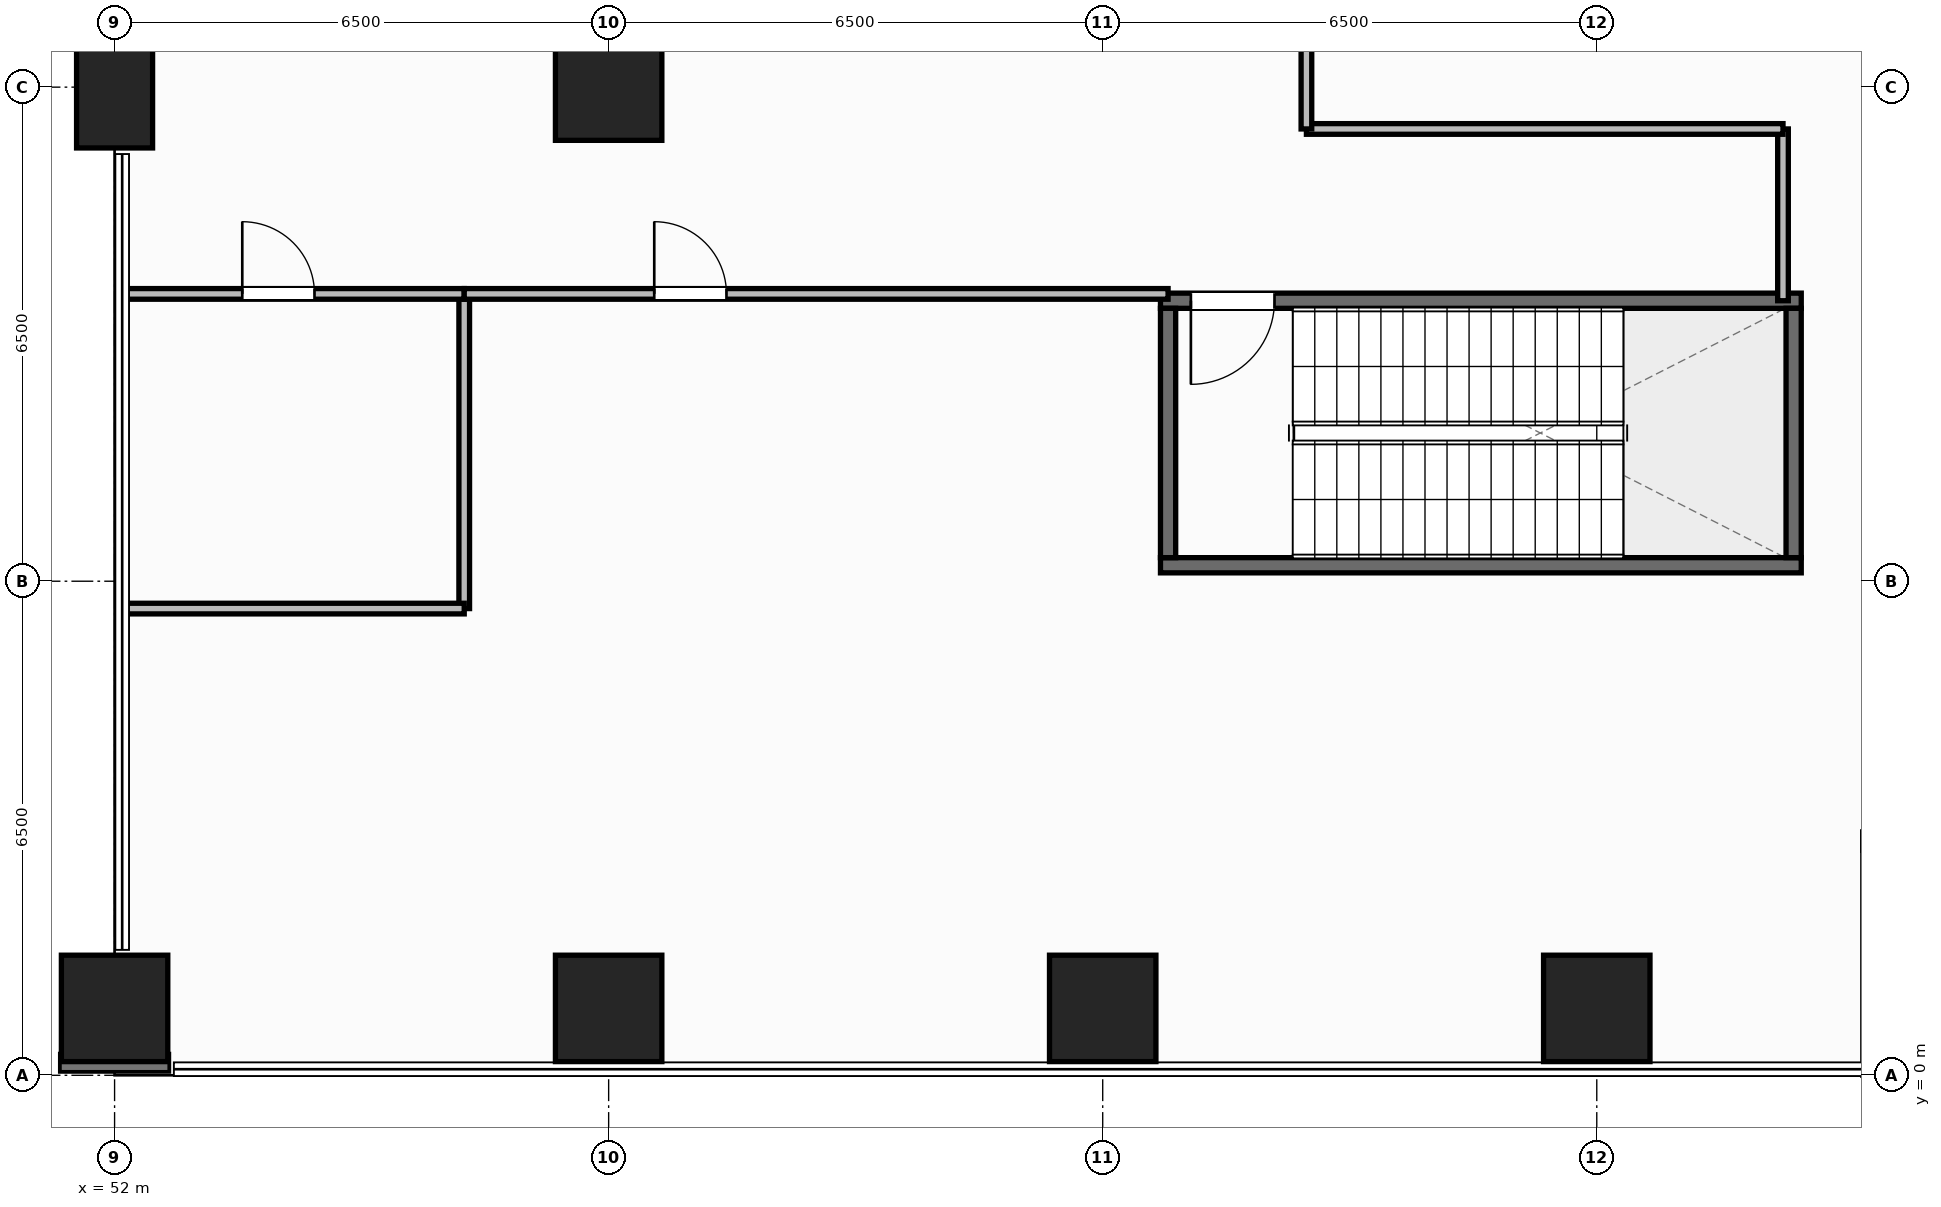
"""IFC4 building model, lengths in metres.
Left out: names, types, materials, properties, quantities, classifications, styles, units other than length and angle.
Written with IfcOpenShell. Run it as: python <this file> out.ifc"""

import sys

from ifc_helpers import new_model, si_unit, direction, frame, frame_2d, origin, origin_2d, place, context, subcontext, project, spatial, rectangle, extrude, element, fill, save


model = new_model("IFC4")
c1 = context("Model", 3, precision=1e-05, world=origin(), true_north=direction((0.0, 1.0)))
c2 = subcontext(c1, "Body", "Model", "MODEL_VIEW")
j1 = project(units=[si_unit("LENGTHUNIT", "METRE"), si_unit("PLANEANGLEUNIT", "RADIAN")], contexts=[c1])
p1 = place(None, origin())
s1 = spatial("IfcSite", under=j1, at=p1, CompositionType="ELEMENT")
p2 = place(p1, origin())
s2 = spatial("IfcBuilding", under=s1, at=p2, CompositionType="ELEMENT")
p3 = place(p2, frame((0.0, 0.0, 11.5)))
s3 = spatial("IfcBuildingStorey", under=s2, at=p3, CompositionType="ELEMENT", Elevation=11.5)
p4 = place(p3, frame((65.76, 6.71, 0.0), z_axis=(0.0, 0.0, 1.0), x_axis=(1.0, 0.0, 0.0)))
e1 = element("IfcWall", 1, at=p4, inside=s3, PredefinedType="SHEAR", context=c2, shape_type="SweptSolid", body=[
    extrude(rectangle(XDim=8.43, YDim=0.2, at=frame_2d((4.215, 0.0))), origin(), (0.0, 0.0, 1.0), 5.5),
])
p5 = place(p3, frame((65.76, 10.19, 0.0), z_axis=(0.0, 0.0, 1.0), x_axis=(1.0, 0.0, 0.0)))
e2 = element("IfcWall", 2, at=p5, inside=s3, PredefinedType="SHEAR", context=c2, shape_type="SweptSolid", body=[
    extrude(rectangle(XDim=8.43, YDim=0.2, at=frame_2d((4.215, 0.0))), origin(), (0.0, 0.0, 1.0), 5.5),
])
p6 = place(p5, frame((0.4, 0.0, 0.0)))
e3 = element("IfcOpeningElement", 3, at=p6, cuts=e2, PredefinedType="OPENING", context=c2, shape_type="SweptSolid", body=[
    extrude(rectangle(XDim=1.1, YDim=2.15, at=frame_2d((0.55, 1.075))), frame((0.0, 0.11, 0.0), z_axis=(0.0, -1.0, 0.0), x_axis=(1.0, 0.0, 0.0)), (0.0, 0.0, 1.0), 0.22),
])
for number, where, z_axis, x_axis in (
    (4, (65.86, 6.81, 0.0), (0.0, 0.0, 1.0), (0.0, 1.0, 0.0)),
    (5, (74.09, 6.81, 0.0), (0.0, 0.0, 1.0), (0.0, 1.0, 0.0)),
):
    element("IfcWall", number, at=place(p3, frame(where, z_axis=z_axis, x_axis=x_axis)), inside=s3, PredefinedType="SHEAR", context=c2, shape_type="SweptSolid", body=[
        extrude(rectangle(XDim=3.28, YDim=0.2, at=frame_2d((1.64, 0.0))), origin(), (0.0, 0.0, 1.0), 5.5),
    ])
p7 = place(p3, frame((58.5, 13.0, 0.0), z_axis=(0.0, 0.0, 1.0), x_axis=(1.0, 0.0, 0.0)))
e6 = element("IfcColumn", 6, at=p7, inside=s3, PredefinedType="COLUMN", context=c2, shape_type="SweptSolid", body=[
    extrude(rectangle(XDim=1.4, YDim=1.4, at=origin_2d()), origin(), (0.0, 0.0, 1.0), 5.5),
])
p8 = place(p3, frame((52.0, 13.0, 0.0), z_axis=(0.0, 0.0, 1.0), x_axis=(1.0, 0.0, 0.0)))
e7 = element("IfcColumn", 7, at=p8, inside=s3, PredefinedType="PILASTER", context=c2, shape_type="SweptSolid", body=[
    extrude(rectangle(XDim=1.0, YDim=1.6, at=origin_2d()), origin(), (0.0, 0.0, 1.0), 5.5),
])
for number, where, z_axis, x_axis in (
    (8, (52.0, 0.88, 0.0), (0.0, 0.0, 1.0), (1.0, 0.0, 0.0)),
    (9, (58.5, 0.88, 0.0), (0.0, 0.0, 1.0), (1.0, 0.0, 0.0)),
    (10, (65.0, 0.88, 0.0), (0.0, 0.0, 1.0), (1.0, 0.0, 0.0)),
    (11, (71.5, 0.88, 0.0), (0.0, 0.0, 1.0), (1.0, 0.0, 0.0)),
):
    element("IfcColumn", number, at=place(p3, frame(where, z_axis=z_axis, x_axis=x_axis)), inside=s3, PredefinedType="COLUMN", context=c2, shape_type="SweptSolid", body=[
        extrude(rectangle(XDim=1.4, YDim=1.4, at=origin_2d()), origin(), (0.0, 0.0, 1.0), 5.5),
    ])
p9 = place(p3, frame((56.6, 6.14, 0.0), z_axis=(0.0, 0.0, 1.0), x_axis=(0.0, 1.0, 0.0)))
e12 = element("IfcWall", 12, at=p9, inside=s3, PredefinedType="PARTITIONING", context=c2, shape_type="SweptSolid", body=[
    extrude(rectangle(XDim=4.14, YDim=0.14, at=frame_2d((2.07, 0.0))), origin(), (0.0, 0.0, 1.0), 5.22),
])
p10 = place(p3, frame((52.08, 6.14, 0.0), z_axis=(0.0, 0.0, 1.0), x_axis=(1.0, 0.0, 0.0)))
e13 = element("IfcWall", 13, at=p10, inside=s3, PredefinedType="PARTITIONING", context=c2, shape_type="SweptSolid", body=[
    extrude(rectangle(XDim=4.52, YDim=0.14, at=frame_2d((2.26, 0.0))), origin(), (0.0, 0.0, 1.0), 5.22),
])
p11 = place(p3, frame((73.95, 10.19, 0.0), z_axis=(0.0, 0.0, 1.0), x_axis=(0.0, 1.0, 0.0)))
e14 = element("IfcWall", 14, at=p11, inside=s3, PredefinedType="PARTITIONING", context=c2, shape_type="SweptSolid", body=[
    extrude(rectangle(XDim=2.26, YDim=0.14, at=frame_2d((1.13, 0.0))), origin(), (0.0, 0.0, 1.0), 5.22),
])
p12 = place(p3, frame((67.68, 12.45, 0.0), z_axis=(0.0, 0.0, 1.0), x_axis=(1.0, 0.0, 0.0)))
e15 = element("IfcWall", 15, at=p12, inside=s3, PredefinedType="PARTITIONING", context=c2, shape_type="SweptSolid", body=[
    extrude(rectangle(XDim=6.27, YDim=0.14, at=frame_2d((3.135, 0.0))), origin(), (0.0, 0.0, 1.0), 5.22),
])
p13 = place(p3, frame((67.68, 12.45, 0.0), z_axis=(0.0, 0.0, 1.0), x_axis=(0.0, 1.0, 0.0)))
e16 = element("IfcWall", 16, at=p13, inside=s3, PredefinedType="PARTITIONING", context=c2, shape_type="SweptSolid", body=[
    extrude(rectangle(XDim=23.13, YDim=0.14, at=frame_2d((11.565, 0.0))), origin(), (0.0, 0.0, 1.0), 5.22),
])
p14 = place(p13, frame((5.0, 0.0, 0.0)))
e17 = element("IfcOpeningElement", 17, at=p14, cuts=e16, PredefinedType="OPENING", context=c2, shape_type="SweptSolid", body=[
    extrude(rectangle(XDim=1.1, YDim=2.15, at=frame_2d((0.55, 1.075))), frame((0.0, 0.08, 0.0), z_axis=(0.0, -1.0, 0.0), x_axis=(1.0, 0.0, 0.0)), (0.0, 0.0, 1.0), 0.16),
])
p15 = place(p3, frame((52.08, 10.28, 0.0), z_axis=(0.0, 0.0, 1.0), x_axis=(1.0, 0.0, 0.0)))
e18 = element("IfcWall", 18, at=p15, inside=s3, PredefinedType="PARTITIONING", context=c2, shape_type="SweptSolid", body=[
    extrude(rectangle(XDim=4.52, YDim=0.14, at=frame_2d((2.26, 0.0))), origin(), (0.0, 0.0, 1.0), 5.22),
])
p16 = place(p15, frame((1.6, 0.0, 0.0)))
e19 = element("IfcOpeningElement", 19, at=p16, cuts=e18, PredefinedType="OPENING", context=c2, shape_type="SweptSolid", body=[
    extrude(rectangle(XDim=0.95, YDim=2.15, at=frame_2d((0.475, 1.075))), frame((0.0, 0.08, 0.0), z_axis=(0.0, -1.0, 0.0), x_axis=(1.0, 0.0, 0.0)), (0.0, 0.0, 1.0), 0.16),
])
p17 = place(p3, frame((56.6, 10.28, 0.0), z_axis=(0.0, 0.0, 1.0), x_axis=(1.0, 0.0, 0.0)))
e20 = element("IfcWall", 20, at=p17, inside=s3, PredefinedType="PARTITIONING", context=c2, shape_type="SweptSolid", body=[
    extrude(rectangle(XDim=9.26, YDim=0.14, at=frame_2d((4.63, 0.0))), origin(), (0.0, 0.0, 1.0), 5.22),
])
p18 = place(p17, frame((2.5, 0.0, 0.0)))
e21 = element("IfcOpeningElement", 21, at=p18, cuts=e20, PredefinedType="OPENING", context=c2, shape_type="SweptSolid", body=[
    extrude(rectangle(XDim=0.95, YDim=2.15, at=frame_2d((0.475, 1.075))), frame((0.0, 0.08, 0.0), z_axis=(0.0, -1.0, 0.0), x_axis=(1.0, 0.0, 0.0)), (0.0, 0.0, 1.0), 0.16),
])
p19 = place(p6, origin())
e22 = element("IfcDoor", 22, at=p19, inside=s3, OperationType="SINGLE_SWING_RIGHT", PredefinedType="DOOR", context=c2, shape_type="SweptSolid", body=[
    extrude(rectangle(XDim=1.1, YDim=2.15, at=frame_2d((0.55, 1.075))), frame((0.0, 0.025, 0.0), z_axis=(0.0, -1.0, 0.0), x_axis=(1.0, 0.0, 0.0)), (0.0, 0.0, 1.0), 0.05),
])
fill(e3, e22)
p20 = place(p16, origin())
e23 = element("IfcDoor", 23, at=p20, inside=s3, OperationType="SINGLE_SWING_LEFT", PredefinedType="DOOR", context=c2, shape_type="SweptSolid", body=[
    extrude(rectangle(XDim=0.95, YDim=2.15, at=frame_2d((0.475, 1.075))), frame((0.0, 0.025, 0.0), z_axis=(0.0, -1.0, 0.0), x_axis=(1.0, 0.0, 0.0)), (0.0, 0.0, 1.0), 0.05),
])
fill(e19, e23)
p21 = place(p18, origin())
e24 = element("IfcDoor", 24, at=p21, inside=s3, OperationType="SINGLE_SWING_LEFT", PredefinedType="DOOR", context=c2, shape_type="SweptSolid", body=[
    extrude(rectangle(XDim=0.95, YDim=2.15, at=frame_2d((0.475, 1.075))), frame((0.0, 0.025, 0.0), z_axis=(0.0, -1.0, 0.0), x_axis=(1.0, 0.0, 0.0)), (0.0, 0.0, 1.0), 0.05),
])
fill(e21, e24)
save(model, sys.argv[1])
